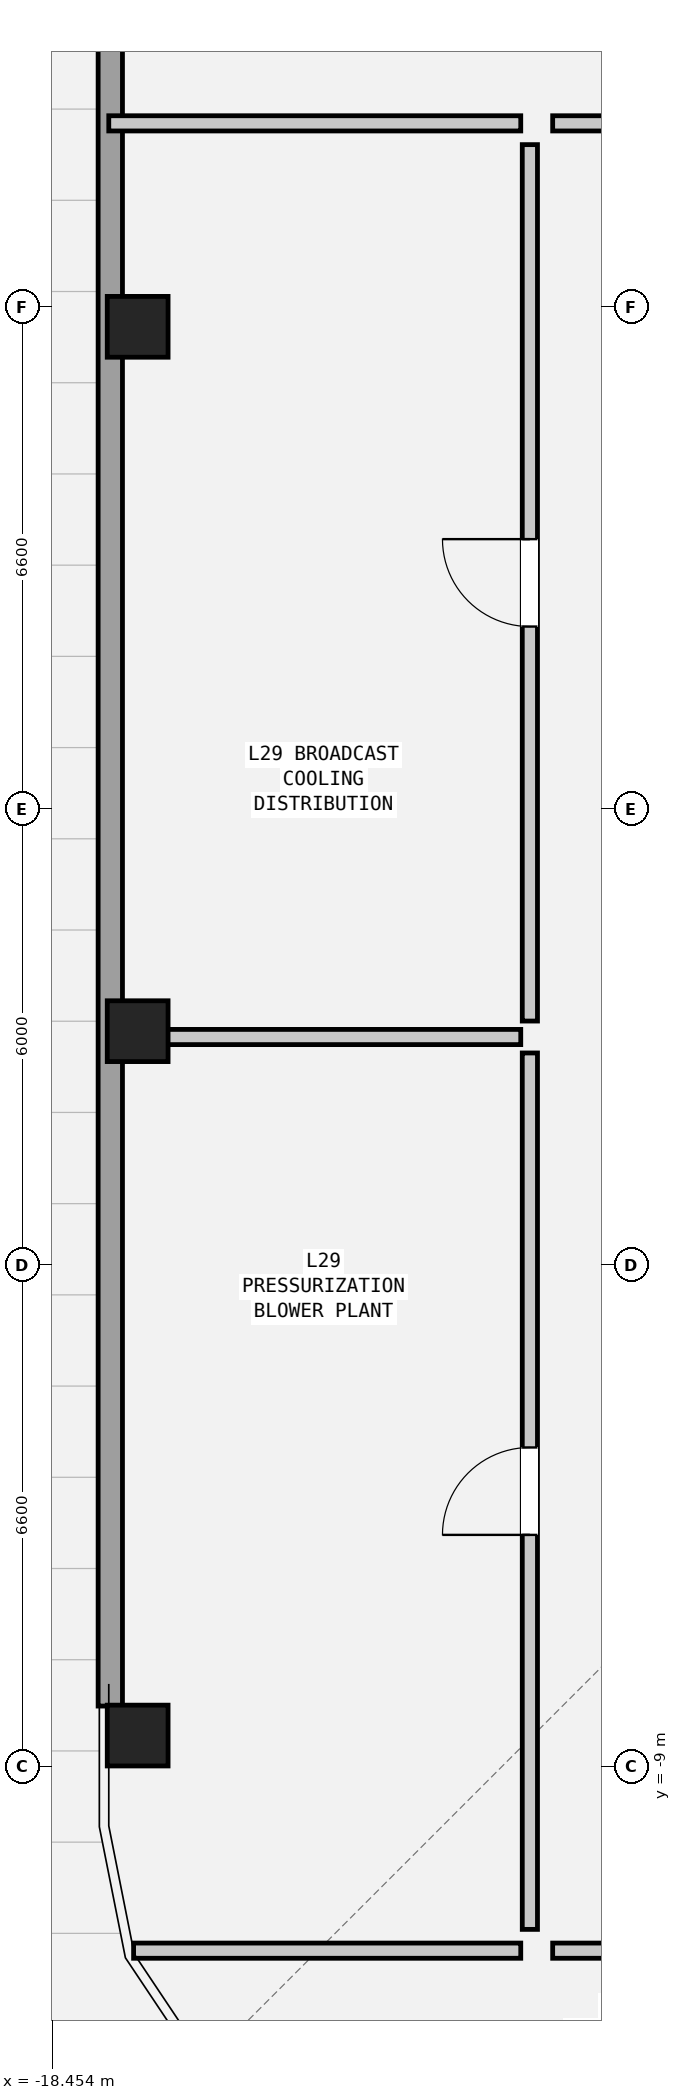
"""IFC4 building model, lengths in metres.
Left out: names, types, materials, properties, quantities, classifications, styles, units other than length and angle.
Written with IfcOpenShell. Run it as: python <this file> out.ifc"""

import sys

from ifc_helpers import new_model, si_unit, direction, frame, frame_2d, origin, origin_2d, place, context, subcontext, project, spatial, rectangle, hollow_rectangle, extrude, element, fill, save


model = new_model("IFC4")
c1 = context("Model", 3, precision=1e-05, world=origin(), true_north=direction((0.0, 1.0)))
c2 = subcontext(c1, "Body", "Model", "MODEL_VIEW")
j1 = project(units=[si_unit("LENGTHUNIT", "METRE"), si_unit("PLANEANGLEUNIT", "RADIAN")], contexts=[c1])
p1 = place(None, origin())
s1 = spatial("IfcSite", under=j1, at=p1, CompositionType="ELEMENT")
p2 = place(p1, origin())
s2 = spatial("IfcBuilding", under=s1, at=p2, CompositionType="ELEMENT")
p3 = place(p2, frame((0.0, 0.0, 101.25)))
s3 = spatial("IfcBuildingStorey", under=s2, at=p3, CompositionType="ELEMENT", Elevation=101.25)
for number, where, z_axis, x_axis in (
    (1, (-17.33, 9.943, 0.0), (0.0, 0.0, 1.0), (0.0, 1.0, 0.0)),
    (2, (-17.33, 0.677, 0.0), (0.0, 0.0, 1.0), (0.0, 1.0, 0.0)),
    (3, (-17.33, -8.59, 0.0), (0.0, 0.0, 1.0), (0.0, 1.0, 0.0)),
):
    element("IfcColumn", number, at=place(p3, frame(where, z_axis=z_axis, x_axis=x_axis)), inside=s3, PredefinedType="COLUMN", context=c2, shape_type="SweptSolid", body=[
        extrude(hollow_rectangle(XDim=0.8, YDim=0.8, WallThickness=0.05, at=origin_2d()), origin(), (0.0, 0.0, 1.0), 3.6),
    ])
p4 = place(p3, frame((-17.69, -8.202, 0.0), z_axis=(0.0, 0.0, 1.0), x_axis=(0.0, 1.0, 0.0)))
e4 = element("IfcWall", 4, at=p4, inside=s3, PredefinedType="SOLIDWALL", context=c2, shape_type="SweptSolid", body=[
    extrude(rectangle(XDim=27.024, YDim=0.32, at=frame_2d((13.512, 0.0))), origin(), (0.0, 0.0, 1.0), 2.082),
])
p5 = place(p3, frame((-11.87, 12.62, 0.0), z_axis=(0.0, 0.0, 1.0), x_axis=(1.0, 0.0, 0.0)))
e5 = element("IfcWall", 5, at=p5, inside=s3, PredefinedType="PARTITIONING", context=c2, shape_type="SweptSolid", body=[
    extrude(rectangle(XDim=5.89, YDim=0.2, at=frame_2d((2.945, 0.0))), origin(), (0.0, 0.0, 1.0), 3.22),
])
p6 = place(p5, frame((2.97, 0.0, 0.0)))
e6 = element("IfcOpeningElement", 6, at=p6, cuts=e5, PredefinedType="OPENING", context=c2, shape_type="SweptSolid", body=[
    extrude(rectangle(XDim=1.15, YDim=2.1, at=frame_2d((0.575, 1.05))), frame((0.0, 0.112, 0.0), z_axis=(0.0, -1.0, 0.0), x_axis=(1.0, 0.0, 0.0)), (0.0, 0.0, 1.0), 0.224),
])
p7 = place(p3, frame((-11.87, -11.42, 0.0), z_axis=(0.0, 0.0, 1.0), x_axis=(1.0, 0.0, 0.0)))
e7 = element("IfcWall", 7, at=p7, inside=s3, PredefinedType="PARTITIONING", context=c2, shape_type="SweptSolid", body=[
    extrude(rectangle(XDim=5.89, YDim=0.2, at=frame_2d((2.945, 0.0))), origin(), (0.0, 0.0, 1.0), 2.741),
])
p8 = place(p7, frame((2.97, 0.0, 0.0)))
e8 = element("IfcOpeningElement", 8, at=p8, cuts=e7, PredefinedType="OPENING", context=c2, shape_type="SweptSolid", body=[
    extrude(rectangle(XDim=1.15, YDim=2.1, at=frame_2d((0.575, 1.05))), frame((0.0, 0.112, 0.0), z_axis=(0.0, -1.0, 0.0), x_axis=(1.0, 0.0, 0.0)), (0.0, 0.0, 1.0), 0.224),
])
p9 = place(p3, frame((-17.71, 12.62, 0.0), z_axis=(0.0, 0.0, 1.0), x_axis=(1.0, 0.0, 0.0)))
e9 = element("IfcWall", 9, at=p9, inside=s3, PredefinedType="PARTITIONING", context=c2, shape_type="SweptSolid", body=[
    extrude(rectangle(XDim=5.42, YDim=0.2, at=frame_2d((2.71, 0.0))), origin(), (0.0, 0.0, 1.0), 3.22),
])
p10 = place(p3, frame((-17.384, -11.42, 0.0), z_axis=(0.0, 0.0, 1.0), x_axis=(1.0, 0.0, 0.0)))
e10 = element("IfcWall", 10, at=p10, inside=s3, PredefinedType="PARTITIONING", context=c2, shape_type="SweptSolid", body=[
    extrude(rectangle(XDim=5.094, YDim=0.2, at=frame_2d((2.547, 0.0))), origin(), (0.0, 0.0, 1.0), 2.741),
])
p11 = place(p3, frame((-17.71, 0.6, 0.0), z_axis=(0.0, 0.0, 1.0), x_axis=(1.0, 0.0, 0.0)))
e11 = element("IfcWall", 11, at=p11, inside=s3, PredefinedType="PARTITIONING", context=c2, shape_type="SweptSolid", body=[
    extrude(rectangle(XDim=5.42, YDim=0.2, at=frame_2d((2.71, 0.0))), origin(), (0.0, 0.0, 1.0), 2.741),
])
p12 = place(p3, frame((-12.17, -11.14, 0.0), z_axis=(0.0, 0.0, 1.0), x_axis=(0.0, 1.0, 0.0)))
e12 = element("IfcWall", 12, at=p12, inside=s3, PredefinedType="PARTITIONING", context=c2, shape_type="SweptSolid", body=[
    extrude(rectangle(XDim=11.53, YDim=0.2, at=frame_2d((5.765, 0.0))), origin(), (0.0, 0.0, 1.0), 3.22),
])
p13 = place(p12, frame((5.19, 0.0, 0.0)))
e13 = element("IfcOpeningElement", 13, at=p13, cuts=e12, PredefinedType="OPENING", context=c2, shape_type="SweptSolid", body=[
    extrude(rectangle(XDim=1.15, YDim=2.1, at=frame_2d((0.575, 1.05))), frame((0.0, 0.112, 0.0), z_axis=(0.0, -1.0, 0.0), x_axis=(1.0, 0.0, 0.0)), (0.0, 0.0, 1.0), 0.224),
])
p14 = place(p3, frame((-12.17, 0.81, 0.0), z_axis=(0.0, 0.0, 1.0), x_axis=(0.0, 1.0, 0.0)))
e14 = element("IfcWall", 14, at=p14, inside=s3, PredefinedType="PARTITIONING", context=c2, shape_type="SweptSolid", body=[
    extrude(rectangle(XDim=11.53, YDim=0.2, at=frame_2d((5.765, 0.0))), origin(), (0.0, 0.0, 1.0), 3.22),
])
p15 = place(p14, frame((5.19, 0.0, 0.0)))
e15 = element("IfcOpeningElement", 15, at=p15, cuts=e14, PredefinedType="OPENING", context=c2, shape_type="SweptSolid", body=[
    extrude(rectangle(XDim=1.15, YDim=2.1, at=frame_2d((0.575, 1.05))), frame((0.0, 0.112, 0.0), z_axis=(0.0, -1.0, 0.0), x_axis=(1.0, 0.0, 0.0)), (0.0, 0.0, 1.0), 0.224),
])
p16 = place(p13, origin())
e16 = element("IfcDoor", 16, at=p16, inside=s3, OperationType="SINGLE_SWING_LEFT", PredefinedType="DOOR", context=c2, shape_type="SweptSolid", body=[
    extrude(rectangle(XDim=1.15, YDim=2.1, at=frame_2d((0.575, 1.05))), frame((0.0, 0.025, 0.0), z_axis=(0.0, -1.0, 0.0), x_axis=(1.0, 0.0, 0.0)), (0.0, 0.0, 1.0), 0.05),
])
fill(e13, e16)
p17 = place(p15, origin())
e17 = element("IfcDoor", 17, at=p17, inside=s3, OperationType="SINGLE_SWING_RIGHT", PredefinedType="DOOR", context=c2, shape_type="SweptSolid", body=[
    extrude(rectangle(XDim=1.15, YDim=2.1, at=frame_2d((0.575, 1.05))), frame((0.0, 0.025, 0.0), z_axis=(0.0, -1.0, 0.0), x_axis=(1.0, 0.0, 0.0)), (0.0, 0.0, 1.0), 0.05),
])
fill(e15, e17)
save(model, sys.argv[1])
